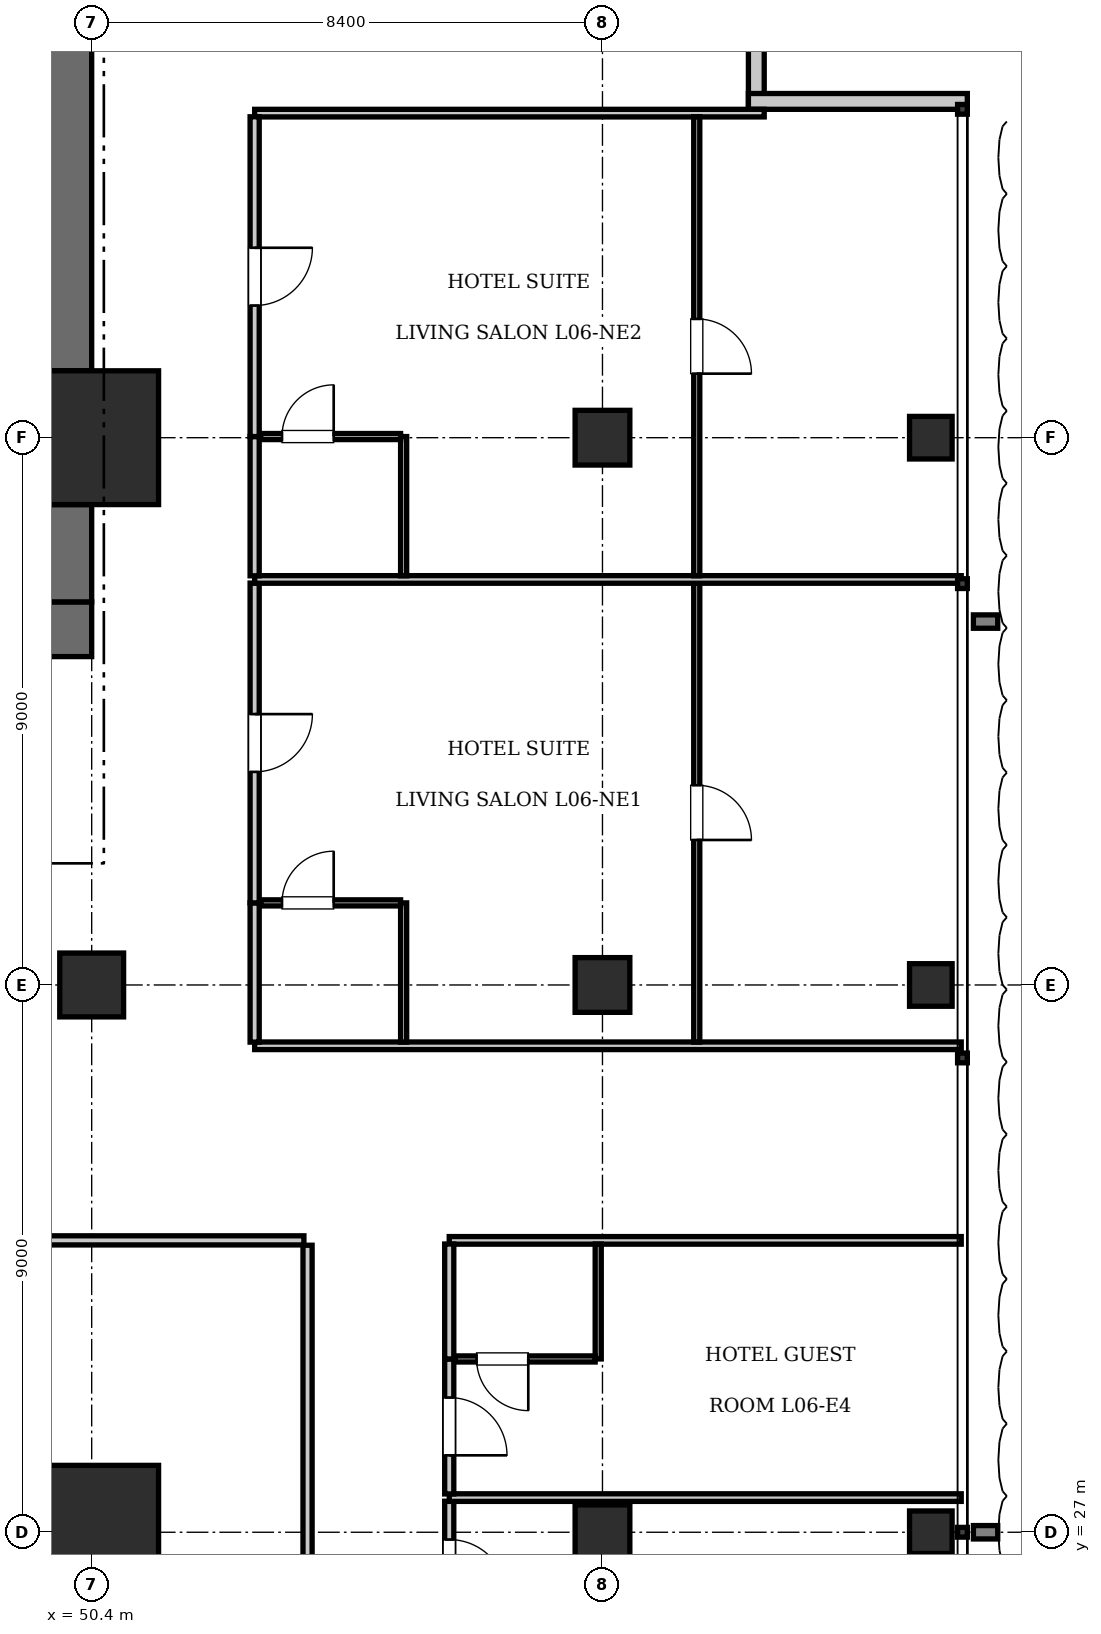
"""IFC4 building model, lengths in metres.
Left out: names, types, materials, properties, quantities, classifications, styles, units other than length and angle.
Written with IfcOpenShell. Run it as: python <this file> out.ifc"""

import sys

from ifc_helpers import new_model, si_unit, direction, frame, frame_2d, origin, origin_2d, place, context, subcontext, project, spatial, rectangle, i_section, extrude, element, fill, save


model = new_model("IFC4")
c1 = context("Model", 3, precision=1e-05, world=origin(), true_north=direction((0.0, 1.0)))
c2 = subcontext(c1, "Body", "Model", "MODEL_VIEW")
j1 = project(units=[si_unit("LENGTHUNIT", "METRE"), si_unit("PLANEANGLEUNIT", "RADIAN")], contexts=[c1])
p1 = place(None, origin())
s1 = spatial("IfcSite", under=j1, at=p1, CompositionType="ELEMENT")
p2 = place(p1, origin())
s2 = spatial("IfcBuilding", under=s1, at=p2, CompositionType="ELEMENT")
p3 = place(p2, frame((0.0, 0.0, 30.8)))
s3 = spatial("IfcBuildingStorey", under=s2, at=p3, CompositionType="ELEMENT", Elevation=30.8)
for number, where, z_axis, x_axis in (
    (1, (50.4, 27.0, 0.0), (0.0, 0.0, 1.0), (1.0, 0.0, 0.0)),
    (2, (50.4, 45.0, 0.0), (0.0, 0.0, 1.0), (1.0, 0.0, 0.0)),
):
    element("IfcColumn", number, at=place(p3, frame(where, z_axis=z_axis, x_axis=x_axis)), inside=s3, PredefinedType="COLUMN", context=c2, shape_type="SweptSolid", body=[
        extrude(rectangle(XDim=2.2, YDim=2.2, at=origin_2d()), origin(), (0.0, 0.0, 1.0), 3.85),
    ])
p4 = place(p3, frame((43.6, 41.85, 0.0), z_axis=(0.0, 0.0, 1.0), x_axis=(1.0, 0.0, 0.0)))
e3 = element("IfcWall", 3, at=p4, inside=s3, PredefinedType="SHEAR", context=c2, shape_type="SweptSolid", body=[
    extrude(rectangle(XDim=6.8, YDim=0.9, at=frame_2d((3.4, 0.0))), origin(), (0.0, 0.0, 1.0), 3.85),
])
p5 = place(p4, frame((3.9, 0.0, 0.0)))
e4 = element("IfcOpeningElement", 4, at=p5, cuts=e3, PredefinedType="OPENING", context=c2, shape_type="SweptSolid", body=[
    extrude(rectangle(XDim=1.15, YDim=2.15, at=frame_2d((0.575, 1.075))), frame((0.0, 0.46, 0.0), z_axis=(0.0, -1.0, 0.0), x_axis=(1.0, 0.0, 0.0)), (0.0, 0.0, 1.0), 0.92),
])
p6 = place(p4, frame((0.55, 0.0, 0.0)))
e5 = element("IfcOpeningElement", 5, at=p6, cuts=e3, PredefinedType="OPENING", context=c2, shape_type="SweptSolid", body=[
    extrude(rectangle(XDim=1.1, YDim=2.2, at=frame_2d((0.55, 1.1))), frame((0.0, 0.46, 0.0), z_axis=(0.0, -1.0, 0.0), x_axis=(1.0, 0.0, 0.0)), (0.0, 0.0, 1.0), 0.92),
])
p7 = place(p3, frame((49.95, 42.3, 0.0), z_axis=(0.0, 0.0, 1.0), x_axis=(0.0, 1.0, 0.0)))
e6 = element("IfcWall", 6, at=p7, inside=s3, PredefinedType="SHEAR", context=c2, shape_type="SweptSolid", body=[
    extrude(rectangle(XDim=1.6, YDim=0.9, at=frame_2d((0.8, 0.0))), origin(), (0.0, 0.0, 1.0), 3.85),
])
p8 = place(p3, frame((49.95, 46.1, 0.0), z_axis=(0.0, 0.0, 1.0), x_axis=(0.0, 1.0, 0.0)))
e7 = element("IfcWall", 7, at=p8, inside=s3, PredefinedType="SHEAR", context=c2, shape_type="SweptSolid", body=[
    extrude(rectangle(XDim=7.0, YDim=0.9, at=frame_2d((3.5, 0.0))), origin(), (0.0, 0.0, 1.0), 3.85),
])
p9 = place(p3, frame((50.4, 36.0, 0.0), z_axis=(0.0, 0.0, 1.0), x_axis=(1.0, 0.0, 0.0)))
e8 = element("IfcColumn", 8, at=p9, inside=s3, PredefinedType="COLUMN", context=c2, shape_type="SweptSolid", body=[
    extrude(rectangle(XDim=1.05, YDim=1.05, at=origin_2d()), origin(), (0.0, 0.0, 1.0), 3.85),
])
for number, where, z_axis, x_axis in (
    (9, (58.8, 27.0, 0.0), (0.0, 0.0, 1.0), (1.0, 0.0, 0.0)),
    (10, (58.8, 36.0, 0.0), (0.0, 0.0, 1.0), (1.0, 0.0, 0.0)),
    (11, (58.8, 45.0, 0.0), (0.0, 0.0, 1.0), (1.0, 0.0, 0.0)),
):
    element("IfcColumn", number, at=place(p3, frame(where, z_axis=z_axis, x_axis=x_axis)), inside=s3, PredefinedType="COLUMN", context=c2, shape_type="SweptSolid", body=[
        extrude(rectangle(XDim=0.9, YDim=0.9, at=origin_2d()), origin(), (0.0, 0.0, 1.0), 3.85),
    ])
for number, where, z_axis, x_axis in (
    (12, (64.2, 27.0, 0.0), (0.0, 0.0, 1.0), (1.0, 0.0, 0.0)),
    (13, (64.2, 36.0, 0.0), (0.0, 0.0, 1.0), (1.0, 0.0, 0.0)),
    (14, (64.2, 45.0, 0.0), (0.0, 0.0, 1.0), (1.0, 0.0, 0.0)),
):
    element("IfcColumn", number, at=place(p3, frame(where, z_axis=z_axis, x_axis=x_axis)), inside=s3, PredefinedType="COLUMN", context=c2, shape_type="SweptSolid", body=[
        extrude(i_section(OverallWidth=0.7, OverallDepth=0.7, WebThickness=0.028, FlangeThickness=0.044, at=origin_2d()), origin(), (0.0, 0.0, 1.0), 3.85),
    ])
for number, where, z_axis, x_axis in (
    (15, (61.33, 54.0, 0.0), (0.0, 0.0, 1.0), (0.0, -1.0, 0.0)),
    (16, (61.2, 50.53, 0.0), (0.0, 0.0, 1.0), (1.0, 0.0, 0.0)),
):
    element("IfcWall", number, at=place(p3, frame(where, z_axis=z_axis, x_axis=x_axis)), inside=s3, PredefinedType="SOLIDWALL", context=c2, shape_type="SweptSolid", body=[
        extrude(rectangle(XDim=3.6, YDim=0.26, at=frame_2d((1.8, 0.0))), origin(), (0.0, 0.0, 1.0), 3.61),
    ])
p10 = place(p3, frame((53.95, 23.48, 0.0), z_axis=(0.0, 0.0, 1.0), x_axis=(0.0, 1.0, 0.0)))
e17 = element("IfcWall", 17, at=p10, inside=s3, PredefinedType="PARTITIONING", context=c2, shape_type="SweptSolid", body=[
    extrude(rectangle(XDim=8.24, YDim=0.15, at=frame_2d((4.12, 0.0))), origin(), (0.0, 0.0, 1.0), 3.61),
])
p11 = place(p3, frame((42.998, 31.8, 0.0), z_axis=(0.0, 0.0, 1.0), x_axis=(1.0, 0.0, 0.0)))
e18 = element("IfcWall", 18, at=p11, inside=s3, PredefinedType="PARTITIONING", context=c2, shape_type="SweptSolid", body=[
    extrude(rectangle(XDim=10.892, YDim=0.15, at=frame_2d((5.446, 0.0))), origin(), (0.0, 0.0, 1.0), 3.61),
])
p12 = place(p11, frame((4.996, 0.0, 0.0)))
e19 = element("IfcOpeningElement", 19, at=p12, cuts=e18, PredefinedType="OPENING", context=c2, shape_type="SweptSolid", body=[
    extrude(rectangle(XDim=0.9, YDim=2.1, at=frame_2d((0.45, 1.05))), frame((0.0, 0.085, 0.0), z_axis=(0.0, -1.0, 0.0), x_axis=(1.0, 0.0, 0.0)), (0.0, 0.0, 1.0), 0.17),
])
p13 = place(p3, frame((56.28, 31.8, 0.0), z_axis=(0.0, 0.0, 1.0), x_axis=(1.0, 0.0, 0.0)))
e20 = element("IfcWall", 20, at=p13, inside=s3, PredefinedType="PARTITIONING", context=c2, shape_type="SweptSolid", body=[
    extrude(rectangle(XDim=8.42, YDim=0.125, at=frame_2d((4.21, 0.0))), origin(), (0.0, 0.0, 1.0), 3.61),
])
p14 = place(p3, frame((56.28, 25.3, 0.0), z_axis=(0.0, 0.0, 1.0), x_axis=(0.0, 1.0, 0.0)))
e21 = element("IfcWall", 21, at=p14, inside=s3, PredefinedType="PARTITIONING", context=c2, shape_type="SweptSolid", body=[
    extrude(rectangle(XDim=2.21, YDim=0.15, at=frame_2d((1.105, 0.0))), origin(), (0.0, 0.0, 1.0), 3.61),
])
p15 = place(p14, frame((0.63, 0.0, 0.0)))
e22 = element("IfcOpeningElement", 22, at=p15, cuts=e21, PredefinedType="OPENING", context=c2, shape_type="SweptSolid", body=[
    extrude(rectangle(XDim=0.95, YDim=2.15, at=frame_2d((0.475, 1.075))), frame((0.0, 0.085, 0.0), z_axis=(0.0, -1.0, 0.0), x_axis=(1.0, 0.0, 0.0)), (0.0, 0.0, 1.0), 0.17),
])
p16 = place(p3, frame((56.28, 27.57, 0.0), z_axis=(0.0, 0.0, 1.0), x_axis=(1.0, 0.0, 0.0)))
e23 = element("IfcWall", 23, at=p16, inside=s3, PredefinedType="PARTITIONING", context=c2, shape_type="SweptSolid", body=[
    extrude(rectangle(XDim=8.42, YDim=0.125, at=frame_2d((4.21, 0.0))), origin(), (0.0, 0.0, 1.0), 3.61),
])
p17 = place(p3, frame((56.28, 27.63, 0.0), z_axis=(0.0, 0.0, 1.0), x_axis=(0.0, 1.0, 0.0)))
e24 = element("IfcWall", 24, at=p17, inside=s3, PredefinedType="PARTITIONING", context=c2, shape_type="SweptSolid", body=[
    extrude(rectangle(XDim=2.22, YDim=0.15, at=frame_2d((1.11, 0.0))), origin(), (0.0, 0.0, 1.0), 3.61),
])
p18 = place(p17, frame((0.635, 0.0, 0.0)))
e25 = element("IfcOpeningElement", 25, at=p18, cuts=e24, PredefinedType="OPENING", context=c2, shape_type="SweptSolid", body=[
    extrude(rectangle(XDim=0.95, YDim=2.15, at=frame_2d((0.475, 1.075))), frame((0.0, 0.085, 0.0), z_axis=(0.0, -1.0, 0.0), x_axis=(1.0, 0.0, 0.0)), (0.0, 0.0, 1.0), 0.17),
])
p19 = place(p3, frame((56.28, 29.85, 0.0), z_axis=(0.0, 0.0, 1.0), x_axis=(0.0, 1.0, 0.0)))
e26 = element("IfcWall", 26, at=p19, inside=s3, PredefinedType="PARTITIONING", context=c2, shape_type="SweptSolid", body=[
    extrude(rectangle(XDim=1.89, YDim=0.15, at=frame_2d((0.945, 0.0))), origin(), (0.0, 0.0, 1.0), 3.61),
])
p20 = place(p3, frame((58.73, 29.85, 0.0), z_axis=(0.0, 0.0, 1.0), x_axis=(0.0, 1.0, 0.0)))
e27 = element("IfcWall", 27, at=p20, inside=s3, PredefinedType="PARTITIONING", context=c2, shape_type="SweptSolid", body=[
    extrude(rectangle(XDim=1.89, YDim=0.1, at=frame_2d((0.945, 0.0))), origin(), (0.0, 0.0, 1.0), 2.975),
])
p21 = place(p3, frame((56.38, 29.85, 0.0), z_axis=(0.0, 0.0, 1.0), x_axis=(1.0, 0.0, 0.0)))
e28 = element("IfcWall", 28, at=p21, inside=s3, PredefinedType="PARTITIONING", context=c2, shape_type="SweptSolid", body=[
    extrude(rectangle(XDim=2.3, YDim=0.1, at=frame_2d((1.15, 0.0))), origin(), (0.0, 0.0, 1.0), 3.61),
])
p22 = place(p21, frame((0.35, 0.0, 0.0)))
e29 = element("IfcOpeningElement", 29, at=p22, cuts=e28, PredefinedType="OPENING", context=c2, shape_type="SweptSolid", body=[
    extrude(rectangle(XDim=0.85, YDim=2.1, at=frame_2d((0.425, 1.05))), frame((0.0, 0.06, 0.0), z_axis=(0.0, -1.0, 0.0), x_axis=(1.0, 0.0, 0.0)), (0.0, 0.0, 1.0), 0.12),
])
p23 = place(p3, frame((53.08, 35.0, 0.0), z_axis=(0.0, 0.0, 1.0), x_axis=(1.0, 0.0, 0.0)))
e30 = element("IfcWall", 30, at=p23, inside=s3, PredefinedType="PARTITIONING", context=c2, shape_type="SweptSolid", body=[
    extrude(rectangle(XDim=11.62, YDim=0.125, at=frame_2d((5.81, 0.0))), origin(), (0.0, 0.0, 1.0), 3.61),
])
p24 = place(p3, frame((53.08, 50.337, 0.0), z_axis=(0.0, 0.0, 1.0), x_axis=(1.0, 0.0, 0.0)))
e31 = element("IfcWall", 31, at=p24, inside=s3, PredefinedType="PARTITIONING", context=c2, shape_type="SweptSolid", body=[
    extrude(rectangle(XDim=8.38, YDim=0.125, at=frame_2d((4.19, 0.0))), origin(), (0.0, 0.0, 1.0), 3.61),
])
p25 = place(p3, frame((53.08, 35.06, 0.0), z_axis=(0.0, 0.0, 1.0), x_axis=(0.0, 1.0, 0.0)))
e32 = element("IfcWall", 32, at=p25, inside=s3, PredefinedType="PARTITIONING", context=c2, shape_type="SweptSolid", body=[
    extrude(rectangle(XDim=2.29, YDim=0.15, at=frame_2d((1.145, 0.0))), origin(), (0.0, 0.0, 1.0), 3.61),
])
p26 = place(p3, frame((53.08, 37.35, 0.0), z_axis=(0.0, 0.0, 1.0), x_axis=(0.0, 1.0, 0.0)))
e33 = element("IfcWall", 33, at=p26, inside=s3, PredefinedType="PARTITIONING", context=c2, shape_type="SweptSolid", body=[
    extrude(rectangle(XDim=5.259, YDim=0.15, at=frame_2d((2.629, 0.0))), origin(), (0.0, 0.0, 1.0), 3.61),
])
p27 = place(p26, frame((2.154, 0.0, 0.0)))
e34 = element("IfcOpeningElement", 34, at=p27, cuts=e33, PredefinedType="OPENING", context=c2, shape_type="SweptSolid", body=[
    extrude(rectangle(XDim=0.95, YDim=2.15, at=frame_2d((0.475, 1.075))), frame((0.0, 0.085, 0.0), z_axis=(0.0, -1.0, 0.0), x_axis=(1.0, 0.0, 0.0)), (0.0, 0.0, 1.0), 0.17),
])
p28 = place(p3, frame((55.53, 35.06, 0.0), z_axis=(0.0, 0.0, 1.0), x_axis=(0.0, 1.0, 0.0)))
e35 = element("IfcWall", 35, at=p28, inside=s3, PredefinedType="PARTITIONING", context=c2, shape_type="SweptSolid", body=[
    extrude(rectangle(XDim=2.29, YDim=0.1, at=frame_2d((1.145, 0.0))), origin(), (0.0, 0.0, 1.0), 3.61),
])
p29 = place(p3, frame((53.18, 37.35, 0.0), z_axis=(0.0, 0.0, 1.0), x_axis=(1.0, 0.0, 0.0)))
e36 = element("IfcWall", 36, at=p29, inside=s3, PredefinedType="PARTITIONING", context=c2, shape_type="SweptSolid", body=[
    extrude(rectangle(XDim=2.3, YDim=0.1, at=frame_2d((1.15, 0.0))), origin(), (0.0, 0.0, 1.0), 3.61),
])
p30 = place(p29, frame((0.35, 0.0, 0.0)))
e37 = element("IfcOpeningElement", 37, at=p30, cuts=e36, PredefinedType="OPENING", context=c2, shape_type="SweptSolid", body=[
    extrude(rectangle(XDim=0.85, YDim=2.1, at=frame_2d((0.425, 1.05))), frame((0.0, 0.06, 0.0), z_axis=(0.0, -1.0, 0.0), x_axis=(1.0, 0.0, 0.0)), (0.0, 0.0, 1.0), 0.12),
])
p31 = place(p3, frame((60.35, 35.06, 0.0), z_axis=(0.0, 0.0, 1.0), x_axis=(0.0, 1.0, 0.0)))
e38 = element("IfcWall", 38, at=p31, inside=s3, PredefinedType="PARTITIONING", context=c2, shape_type="SweptSolid", body=[
    extrude(rectangle(XDim=7.549, YDim=0.1, at=frame_2d((3.774, 0.0))), origin(), (0.0, 0.0, 1.0), 3.61),
])
p32 = place(p31, frame((3.324, 0.0, 0.0)))
e39 = element("IfcOpeningElement", 39, at=p32, cuts=e38, PredefinedType="OPENING", context=c2, shape_type="SweptSolid", body=[
    extrude(rectangle(XDim=0.9, YDim=2.1, at=frame_2d((0.45, 1.05))), frame((0.0, 0.06, 0.0), z_axis=(0.0, -1.0, 0.0), x_axis=(1.0, 0.0, 0.0)), (0.0, 0.0, 1.0), 0.12),
])
p33 = place(p3, frame((53.08, 42.669, 0.0), z_axis=(0.0, 0.0, 1.0), x_axis=(1.0, 0.0, 0.0)))
e40 = element("IfcWall", 40, at=p33, inside=s3, PredefinedType="PARTITIONING", context=c2, shape_type="SweptSolid", body=[
    extrude(rectangle(XDim=11.62, YDim=0.125, at=frame_2d((5.81, 0.0))), origin(), (0.0, 0.0, 1.0), 3.61),
])
p34 = place(p3, frame((53.08, 42.729, 0.0), z_axis=(0.0, 0.0, 1.0), x_axis=(0.0, 1.0, 0.0)))
e41 = element("IfcWall", 41, at=p34, inside=s3, PredefinedType="PARTITIONING", context=c2, shape_type="SweptSolid", body=[
    extrude(rectangle(XDim=2.29, YDim=0.15, at=frame_2d((1.145, 0.0))), origin(), (0.0, 0.0, 1.0), 3.61),
])
p35 = place(p3, frame((53.08, 45.019, 0.0), z_axis=(0.0, 0.0, 1.0), x_axis=(0.0, 1.0, 0.0)))
e42 = element("IfcWall", 42, at=p35, inside=s3, PredefinedType="PARTITIONING", context=c2, shape_type="SweptSolid", body=[
    extrude(rectangle(XDim=5.259, YDim=0.15, at=frame_2d((2.629, 0.0))), origin(), (0.0, 0.0, 1.0), 3.61),
])
p36 = place(p35, frame((2.154, 0.0, 0.0)))
e43 = element("IfcOpeningElement", 43, at=p36, cuts=e42, PredefinedType="OPENING", context=c2, shape_type="SweptSolid", body=[
    extrude(rectangle(XDim=0.95, YDim=2.15, at=frame_2d((0.475, 1.075))), frame((0.0, 0.085, 0.0), z_axis=(0.0, -1.0, 0.0), x_axis=(1.0, 0.0, 0.0)), (0.0, 0.0, 1.0), 0.17),
])
p37 = place(p3, frame((55.53, 42.729, 0.0), z_axis=(0.0, 0.0, 1.0), x_axis=(0.0, 1.0, 0.0)))
e44 = element("IfcWall", 44, at=p37, inside=s3, PredefinedType="PARTITIONING", context=c2, shape_type="SweptSolid", body=[
    extrude(rectangle(XDim=2.29, YDim=0.1, at=frame_2d((1.145, 0.0))), origin(), (0.0, 0.0, 1.0), 3.61),
])
p38 = place(p3, frame((53.18, 45.019, 0.0), z_axis=(0.0, 0.0, 1.0), x_axis=(1.0, 0.0, 0.0)))
e45 = element("IfcWall", 45, at=p38, inside=s3, PredefinedType="PARTITIONING", context=c2, shape_type="SweptSolid", body=[
    extrude(rectangle(XDim=2.3, YDim=0.1, at=frame_2d((1.15, 0.0))), origin(), (0.0, 0.0, 1.0), 2.975),
])
p39 = place(p38, frame((0.35, 0.0, 0.0)))
e46 = element("IfcOpeningElement", 46, at=p39, cuts=e45, PredefinedType="OPENING", context=c2, shape_type="SweptSolid", body=[
    extrude(rectangle(XDim=0.85, YDim=2.1, at=frame_2d((0.425, 1.05))), frame((0.0, 0.06, 0.0), z_axis=(0.0, -1.0, 0.0), x_axis=(1.0, 0.0, 0.0)), (0.0, 0.0, 1.0), 0.12),
])
p40 = place(p3, frame((60.35, 42.729, 0.0), z_axis=(0.0, 0.0, 1.0), x_axis=(0.0, 1.0, 0.0)))
e47 = element("IfcWall", 47, at=p40, inside=s3, PredefinedType="PARTITIONING", context=c2, shape_type="SweptSolid", body=[
    extrude(rectangle(XDim=7.549, YDim=0.1, at=frame_2d((3.774, 0.0))), origin(), (0.0, 0.0, 1.0), 3.61),
])
p41 = place(p40, frame((3.324, 0.0, 0.0)))
e48 = element("IfcOpeningElement", 48, at=p41, cuts=e47, PredefinedType="OPENING", context=c2, shape_type="SweptSolid", body=[
    extrude(rectangle(XDim=0.9, YDim=2.1, at=frame_2d((0.45, 1.05))), frame((0.0, 0.06, 0.0), z_axis=(0.0, -1.0, 0.0), x_axis=(1.0, 0.0, 0.0)), (0.0, 0.0, 1.0), 0.12),
])
p42 = place(p15, frame((0.95, 0.0, 0.0), z_axis=(0.0, 0.0, 1.0), x_axis=(-1.0, 0.0, 0.0)))
e49 = element("IfcDoor", 49, at=p42, inside=s3, OperationType="SINGLE_SWING_RIGHT", PredefinedType="DOOR", context=c2, shape_type="SweptSolid", body=[
    extrude(rectangle(XDim=0.95, YDim=2.15, at=frame_2d((0.475, 1.075))), frame((0.0, 0.025, 0.0), z_axis=(0.0, -1.0, 0.0), x_axis=(1.0, 0.0, 0.0)), (0.0, 0.0, 1.0), 0.05),
])
fill(e22, e49)
p43 = place(p22, frame((0.85, 0.0, 0.0), z_axis=(0.0, 0.0, 1.0), x_axis=(-1.0, 0.0, 0.0)))
e50 = element("IfcDoor", 50, at=p43, inside=s3, OperationType="SINGLE_SWING_LEFT", PredefinedType="DOOR", context=c2, shape_type="SweptSolid", body=[
    extrude(rectangle(XDim=0.85, YDim=2.1, at=frame_2d((0.425, 1.05))), frame((0.0, 0.025, 0.0), z_axis=(0.0, -1.0, 0.0), x_axis=(1.0, 0.0, 0.0)), (0.0, 0.0, 1.0), 0.05),
])
fill(e29, e50)
p44 = place(p18, frame((0.95, 0.0, 0.0), z_axis=(0.0, 0.0, 1.0), x_axis=(-1.0, 0.0, 0.0)))
e51 = element("IfcDoor", 51, at=p44, inside=s3, OperationType="SINGLE_SWING_RIGHT", PredefinedType="DOOR", context=c2, shape_type="SweptSolid", body=[
    extrude(rectangle(XDim=0.95, YDim=2.15, at=frame_2d((0.475, 1.075))), frame((0.0, 0.025, 0.0), z_axis=(0.0, -1.0, 0.0), x_axis=(1.0, 0.0, 0.0)), (0.0, 0.0, 1.0), 0.05),
])
fill(e25, e51)
p45 = place(p30, origin())
e52 = element("IfcDoor", 52, at=p45, inside=s3, OperationType="SINGLE_SWING_RIGHT", PredefinedType="DOOR", context=c2, shape_type="SweptSolid", body=[
    extrude(rectangle(XDim=0.85, YDim=2.1, at=frame_2d((0.425, 1.05))), frame((0.0, 0.025, 0.0), z_axis=(0.0, -1.0, 0.0), x_axis=(1.0, 0.0, 0.0)), (0.0, 0.0, 1.0), 0.05),
])
fill(e37, e52)
p46 = place(p27, frame((0.95, 0.0, 0.0), z_axis=(0.0, 0.0, 1.0), x_axis=(-1.0, 0.0, 0.0)))
e53 = element("IfcDoor", 53, at=p46, inside=s3, OperationType="SINGLE_SWING_LEFT", PredefinedType="DOOR", context=c2, shape_type="SweptSolid", body=[
    extrude(rectangle(XDim=0.95, YDim=2.15, at=frame_2d((0.475, 1.075))), frame((0.0, 0.025, 0.0), z_axis=(0.0, -1.0, 0.0), x_axis=(1.0, 0.0, 0.0)), (0.0, 0.0, 1.0), 0.05),
])
fill(e34, e53)
p47 = place(p32, frame((0.9, 0.0, 0.0), z_axis=(0.0, 0.0, 1.0), x_axis=(-1.0, 0.0, 0.0)))
e54 = element("IfcDoor", 54, at=p47, inside=s3, OperationType="SINGLE_SWING_RIGHT", PredefinedType="DOOR", context=c2, shape_type="SweptSolid", body=[
    extrude(rectangle(XDim=0.9, YDim=2.1, at=frame_2d((0.45, 1.05))), frame((0.0, 0.025, 0.0), z_axis=(0.0, -1.0, 0.0), x_axis=(1.0, 0.0, 0.0)), (0.0, 0.0, 1.0), 0.05),
])
fill(e39, e54)
p48 = place(p39, origin())
e55 = element("IfcDoor", 55, at=p48, inside=s3, OperationType="SINGLE_SWING_RIGHT", PredefinedType="DOOR", context=c2, shape_type="SweptSolid", body=[
    extrude(rectangle(XDim=0.85, YDim=2.1, at=frame_2d((0.425, 1.05))), frame((0.0, 0.025, 0.0), z_axis=(0.0, -1.0, 0.0), x_axis=(1.0, 0.0, 0.0)), (0.0, 0.0, 1.0), 0.05),
])
fill(e46, e55)
p49 = place(p36, frame((0.95, 0.0, 0.0), z_axis=(0.0, 0.0, 1.0), x_axis=(-1.0, 0.0, 0.0)))
e56 = element("IfcDoor", 56, at=p49, inside=s3, OperationType="SINGLE_SWING_LEFT", PredefinedType="DOOR", context=c2, shape_type="SweptSolid", body=[
    extrude(rectangle(XDim=0.95, YDim=2.15, at=frame_2d((0.475, 1.075))), frame((0.0, 0.025, 0.0), z_axis=(0.0, -1.0, 0.0), x_axis=(1.0, 0.0, 0.0)), (0.0, 0.0, 1.0), 0.05),
])
fill(e43, e56)
p50 = place(p41, frame((0.9, 0.0, 0.0), z_axis=(0.0, 0.0, 1.0), x_axis=(-1.0, 0.0, 0.0)))
e57 = element("IfcDoor", 57, at=p50, inside=s3, OperationType="SINGLE_SWING_RIGHT", PredefinedType="DOOR", context=c2, shape_type="SweptSolid", body=[
    extrude(rectangle(XDim=0.9, YDim=2.1, at=frame_2d((0.45, 1.05))), frame((0.0, 0.025, 0.0), z_axis=(0.0, -1.0, 0.0), x_axis=(1.0, 0.0, 0.0)), (0.0, 0.0, 1.0), 0.05),
])
fill(e48, e57)
save(model, sys.argv[1])
